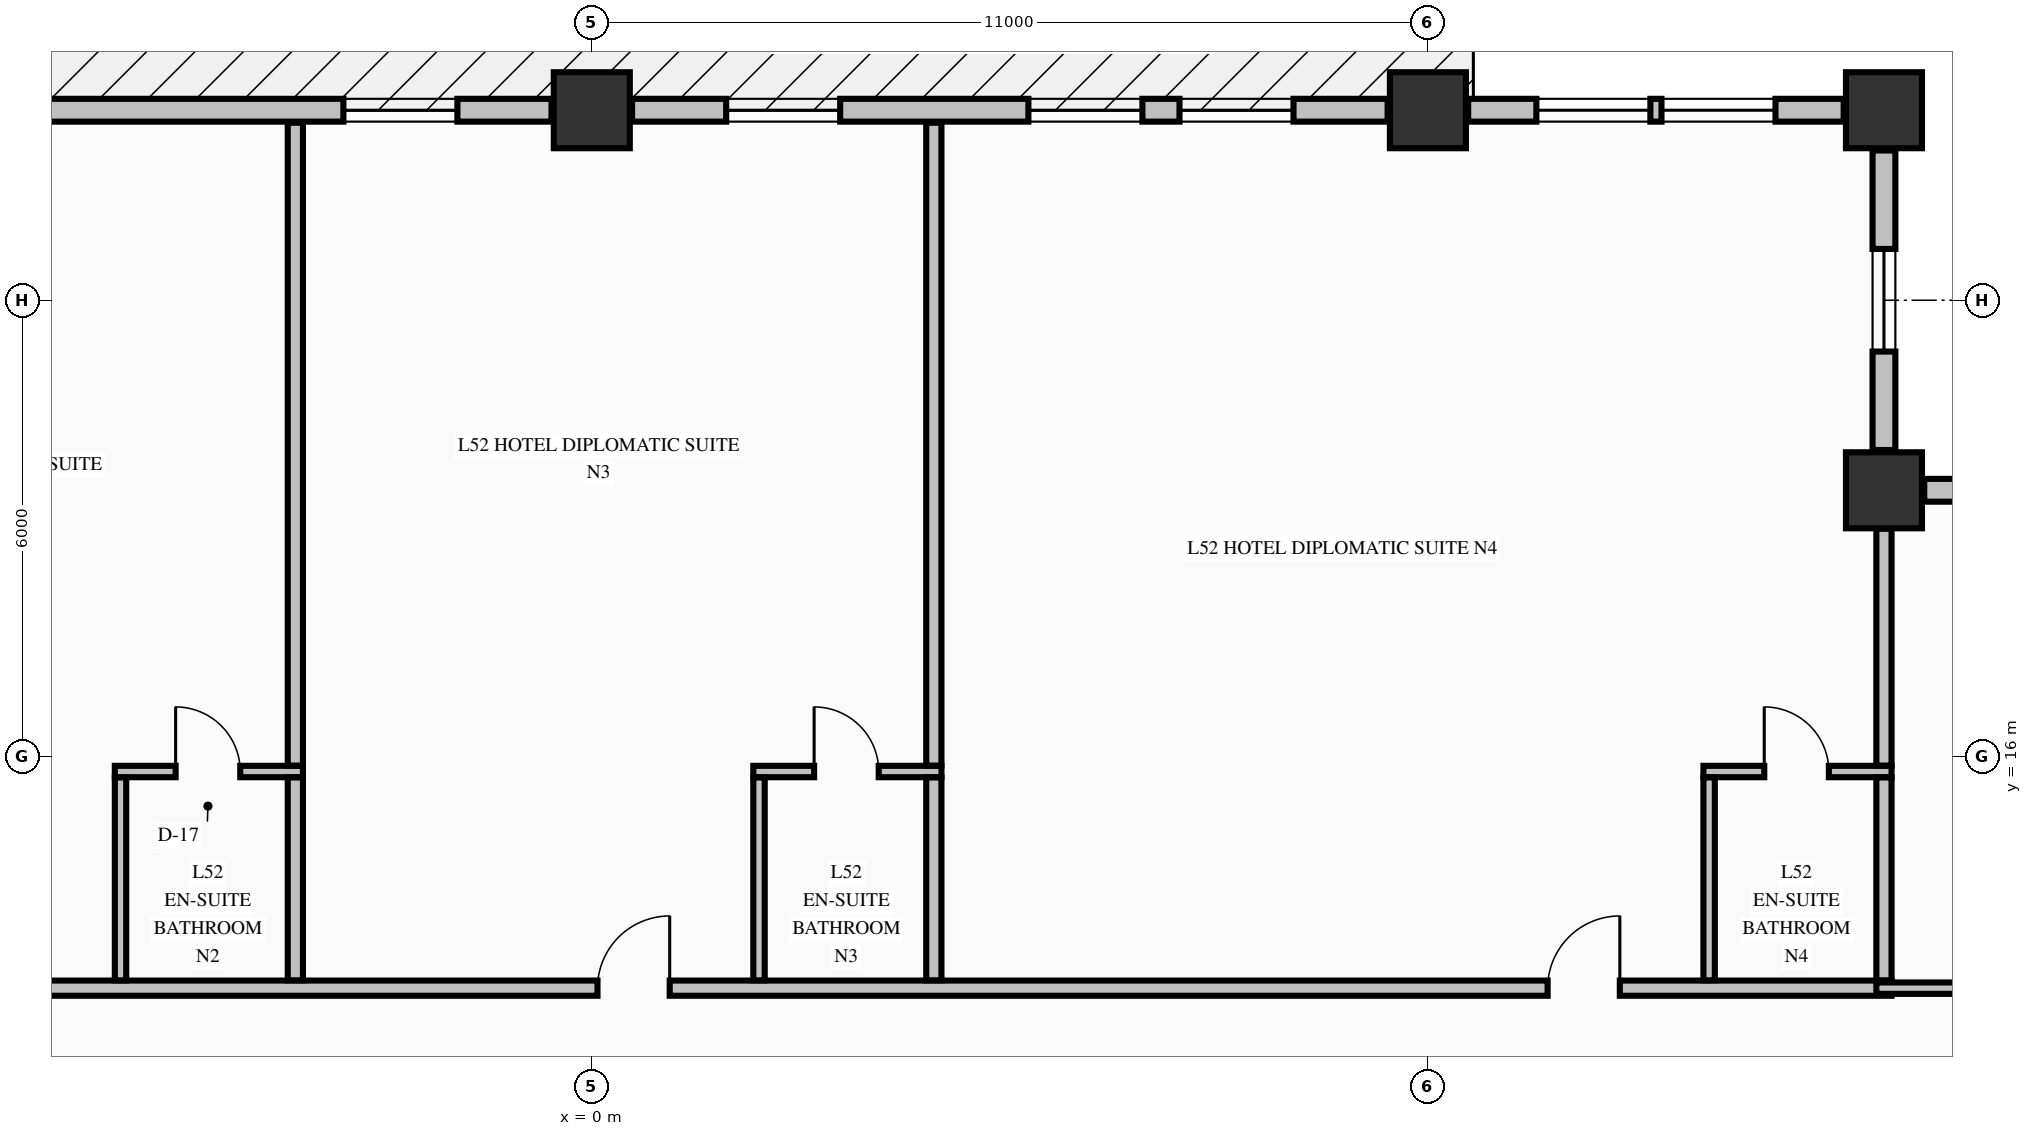
"""IFC4 building model, lengths in metres.
Left out: names, types, materials, properties, quantities, classifications, styles, units other than length and angle.
Written with IfcOpenShell. Run it as: python <this file> out.ifc"""

import sys

from ifc_helpers import new_model, si_unit, direction, frame, frame_2d, origin, origin_2d, place, context, subcontext, project, spatial, rectangle, extrude, element, fill, save


model = new_model("IFC4")
c1 = context("Model", 3, precision=1e-05, world=origin(), true_north=direction((0.0, 1.0)))
c2 = subcontext(c1, "Body", "Model", "MODEL_VIEW")
j1 = project(units=[si_unit("LENGTHUNIT", "METRE"), si_unit("PLANEANGLEUNIT", "RADIAN")], contexts=[c1])
p1 = place(None, origin())
s1 = spatial("IfcSite", under=j1, at=p1, CompositionType="ELEMENT")
p2 = place(p1, origin())
s2 = spatial("IfcBuilding", under=s1, at=p2, CompositionType="ELEMENT")
p3 = place(p2, frame((0.0, 0.0, 201.66)))
s3 = spatial("IfcBuildingStorey", under=s2, at=p3, CompositionType="ELEMENT", Elevation=201.66)
for number, where, z_axis, x_axis in (
    (1, (0.0, 24.5, -0.25), (0.0, 0.0, 1.0), (1.0, 0.0, 0.0)),
    (2, (11.0, 24.5, -0.25), (0.0, 0.0, 1.0), (1.0, 0.0, 0.0)),
    (3, (17.0, 24.5, -0.25), (0.0, 0.0, 1.0), (1.0, 0.0, 0.0)),
    (4, (17.0, 19.5, -0.25), (0.0, 0.0, 1.0), (1.0, 0.0, 0.0)),
):
    element("IfcColumn", number, at=place(p3, frame(where, z_axis=z_axis, x_axis=x_axis)), inside=s3, PredefinedType="COLUMN", context=c2, shape_type="SweptSolid", body=[
        extrude(rectangle(XDim=1.0, YDim=1.0, at=origin_2d()), origin(), (0.0, 0.0, 1.0), 3.4),
    ])
p4 = place(p3, frame((21.47, 19.5, 0.0), z_axis=(0.0, 0.0, 1.0), x_axis=(-1.0, 0.0, 0.0)))
e5 = element("IfcWall", 5, at=p4, inside=s3, PredefinedType="STANDARD", context=c2, shape_type="SweptSolid", body=[
    extrude(rectangle(XDim=3.94, YDim=0.3, at=frame_2d((1.97, 0.0))), origin(), (0.0, 0.0, 1.0), 2.542),
])
p5 = place(p4, frame((1.295, 0.0, 0.68)))
e6 = element("IfcOpeningElement", 6, at=p5, cuts=e5, PredefinedType="OPENING", context=c2, shape_type="SweptSolid", body=[
    extrude(rectangle(XDim=1.35, YDim=1.42, at=frame_2d((0.675, 0.71))), frame((0.0, 0.16, 0.0), z_axis=(0.0, -1.0, 0.0), x_axis=(1.0, 0.0, 0.0)), (0.0, 0.0, 1.0), 0.32),
])
p6 = place(p3, frame((17.0, 20.03, 0.0), z_axis=(0.0, 0.0, 1.0), x_axis=(0.0, 1.0, 0.0)))
e7 = element("IfcWall", 7, at=p6, inside=s3, PredefinedType="STANDARD", context=c2, shape_type="SweptSolid", body=[
    extrude(rectangle(XDim=3.94, YDim=0.3, at=frame_2d((1.97, 0.0))), origin(), (0.0, 0.0, 1.0), 2.542),
])
p7 = place(p6, frame((1.295, 0.0, 0.68)))
e8 = element("IfcOpeningElement", 8, at=p7, cuts=e7, PredefinedType="OPENING", context=c2, shape_type="SweptSolid", body=[
    extrude(rectangle(XDim=1.35, YDim=1.42, at=frame_2d((0.675, 0.71))), frame((0.0, 0.16, 0.0), z_axis=(0.0, -1.0, 0.0), x_axis=(1.0, 0.0, 0.0)), (0.0, 0.0, 1.0), 0.32),
])
p8 = place(p3, frame((-0.53, 24.5, 0.0), z_axis=(0.0, 0.0, 1.0), x_axis=(-1.0, 0.0, 0.0)))
e9 = element("IfcWall", 9, at=p8, inside=s3, PredefinedType="STANDARD", context=c2, shape_type="SweptSolid", body=[
    extrude(rectangle(XDim=9.94, YDim=0.3, at=frame_2d((4.97, 0.0))), origin(), (0.0, 0.0, 1.0), 2.542),
])
p9 = place(p8, frame((6.882, 0.0, 0.0)))
e10 = element("IfcOpeningElement", 10, at=p9, cuts=e9, PredefinedType="OPENING", context=c2, shape_type="SweptSolid", body=[
    extrude(rectangle(XDim=1.1, YDim=2.15, at=frame_2d((0.55, 1.075))), frame((0.0, 0.16, 0.0), z_axis=(0.0, -1.0, 0.0), x_axis=(1.0, 0.0, 0.0)), (0.0, 0.0, 1.0), 0.32),
])
p10 = place(p8, frame((1.238, 0.0, 0.72)))
e11 = element("IfcOpeningElement", 11, at=p10, cuts=e9, PredefinedType="OPENING", context=c2, shape_type="SweptSolid", body=[
    extrude(rectangle(XDim=1.5, YDim=1.6, at=frame_2d((0.75, 0.8))), frame((0.0, 0.16, 0.0), z_axis=(0.0, -1.0, 0.0), x_axis=(1.0, 0.0, 0.0)), (0.0, 0.0, 1.0), 0.32),
])
p11 = place(p3, frame((10.47, 24.5, 0.0), z_axis=(0.0, 0.0, 1.0), x_axis=(-1.0, 0.0, 0.0)))
e12 = element("IfcWall", 12, at=p11, inside=s3, PredefinedType="STANDARD", context=c2, shape_type="SweptSolid", body=[
    extrude(rectangle(XDim=9.94, YDim=0.3, at=frame_2d((4.97, 0.0))), origin(), (0.0, 0.0, 1.0), 2.542),
])
p12 = place(p11, frame((1.238, 0.0, 0.72)))
e13 = element("IfcOpeningElement", 13, at=p12, cuts=e12, PredefinedType="OPENING", context=c2, shape_type="SweptSolid", body=[
    extrude(rectangle(XDim=1.5, YDim=1.6, at=frame_2d((0.75, 0.8))), frame((0.0, 0.16, 0.0), z_axis=(0.0, -1.0, 0.0), x_axis=(1.0, 0.0, 0.0)), (0.0, 0.0, 1.0), 0.32),
])
p13 = place(p11, frame((3.226, 0.0, 0.72)))
e14 = element("IfcOpeningElement", 14, at=p13, cuts=e12, PredefinedType="OPENING", context=c2, shape_type="SweptSolid", body=[
    extrude(rectangle(XDim=1.5, YDim=1.6, at=frame_2d((0.75, 0.8))), frame((0.0, 0.16, 0.0), z_axis=(0.0, -1.0, 0.0), x_axis=(1.0, 0.0, 0.0)), (0.0, 0.0, 1.0), 0.32),
])
p14 = place(p11, frame((7.202, 0.0, 0.72)))
e15 = element("IfcOpeningElement", 15, at=p14, cuts=e12, PredefinedType="OPENING", context=c2, shape_type="SweptSolid", body=[
    extrude(rectangle(XDim=1.5, YDim=1.6, at=frame_2d((0.75, 0.8))), frame((0.0, 0.16, 0.0), z_axis=(0.0, -1.0, 0.0), x_axis=(1.0, 0.0, 0.0)), (0.0, 0.0, 1.0), 0.32),
])
p15 = place(p3, frame((16.47, 24.5, 0.0), z_axis=(0.0, 0.0, 1.0), x_axis=(-1.0, 0.0, 0.0)))
e16 = element("IfcWall", 16, at=p15, inside=s3, PredefinedType="STANDARD", context=c2, shape_type="SweptSolid", body=[
    extrude(rectangle(XDim=4.94, YDim=0.3, at=frame_2d((2.47, 0.0))), origin(), (0.0, 0.0, 1.0), 2.542),
])
p16 = place(p15, frame((0.897, 0.0, 0.72)))
e17 = element("IfcOpeningElement", 17, at=p16, cuts=e16, PredefinedType="OPENING", context=c2, shape_type="SweptSolid", body=[
    extrude(rectangle(XDim=1.5, YDim=1.6, at=frame_2d((0.75, 0.8))), frame((0.0, 0.16, 0.0), z_axis=(0.0, -1.0, 0.0), x_axis=(1.0, 0.0, 0.0)), (0.0, 0.0, 1.0), 0.32),
])
p17 = place(p15, frame((2.543, 0.0, 0.72)))
e18 = element("IfcOpeningElement", 18, at=p17, cuts=e16, PredefinedType="OPENING", context=c2, shape_type="SweptSolid", body=[
    extrude(rectangle(XDim=1.5, YDim=1.6, at=frame_2d((0.75, 0.8))), frame((0.0, 0.16, 0.0), z_axis=(0.0, -1.0, 0.0), x_axis=(1.0, 0.0, 0.0)), (0.0, 0.0, 1.0), 0.32),
])
p18 = place(p3, frame((-22.1, 12.95, 0.0), z_axis=(0.0, 0.0, 1.0), x_axis=(1.0, 0.0, 0.0)))
e19 = element("IfcWall", 19, at=p18, inside=s3, PredefinedType="PARTITIONING", context=c2, shape_type="SweptSolid", body=[
    extrude(rectangle(XDim=39.2, YDim=0.2, at=frame_2d((19.6, 0.0))), origin(), (0.0, 0.0, 1.0), 3.15),
])
p19 = place(p18, frame((4.525, 0.0, 0.0)))
e20 = element("IfcOpeningElement", 20, at=p19, cuts=e19, PredefinedType="OPENING", context=c2, shape_type="SweptSolid", body=[
    extrude(rectangle(XDim=0.95, YDim=2.15, at=frame_2d((0.475, 1.075))), frame((0.0, 0.11, 0.0), z_axis=(0.0, -1.0, 0.0), x_axis=(1.0, 0.0, 0.0)), (0.0, 0.0, 1.0), 0.22),
])
p20 = place(p18, frame((12.475, 0.0, 0.0)))
e21 = element("IfcOpeningElement", 21, at=p20, cuts=e19, PredefinedType="OPENING", context=c2, shape_type="SweptSolid", body=[
    extrude(rectangle(XDim=0.95, YDim=2.15, at=frame_2d((0.475, 1.075))), frame((0.0, 0.11, 0.0), z_axis=(0.0, -1.0, 0.0), x_axis=(1.0, 0.0, 0.0)), (0.0, 0.0, 1.0), 0.22),
])
p21 = place(p18, frame((22.175, 0.0, 0.0)))
e22 = element("IfcOpeningElement", 22, at=p21, cuts=e19, PredefinedType="OPENING", context=c2, shape_type="SweptSolid", body=[
    extrude(rectangle(XDim=0.95, YDim=2.15, at=frame_2d((0.475, 1.075))), frame((0.0, 0.11, 0.0), z_axis=(0.0, -1.0, 0.0), x_axis=(1.0, 0.0, 0.0)), (0.0, 0.0, 1.0), 0.22),
])
p22 = place(p18, frame((34.675, 0.0, 0.0)))
e23 = element("IfcOpeningElement", 23, at=p22, cuts=e19, PredefinedType="OPENING", context=c2, shape_type="SweptSolid", body=[
    extrude(rectangle(XDim=0.95, YDim=2.15, at=frame_2d((0.475, 1.075))), frame((0.0, 0.11, 0.0), z_axis=(0.0, -1.0, 0.0), x_axis=(1.0, 0.0, 0.0)), (0.0, 0.0, 1.0), 0.22),
])
p23 = place(p3, frame((16.9, 12.95, 0.0), z_axis=(0.0, 0.0, 1.0), x_axis=(1.0, 0.0, 0.0)))
e24 = element("IfcWall", 24, at=p23, inside=s3, PredefinedType="PARTITIONING", context=c2, shape_type="SweptSolid", body=[
    extrude(rectangle(XDim=3.175, YDim=0.15, at=frame_2d((1.587, 0.0))), origin(), (0.0, 0.0, 1.0), 3.15),
])
p24 = place(p3, frame((-6.275, 15.8, 0.0), z_axis=(0.0, 0.0, 1.0), x_axis=(1.0, 0.0, 0.0)))
e25 = element("IfcWall", 25, at=p24, inside=s3, PredefinedType="PARTITIONING", context=c2, shape_type="SweptSolid", body=[
    extrude(rectangle(XDim=2.475, YDim=0.15, at=frame_2d((1.237, 0.0))), origin(), (0.0, 0.0, 1.0), 3.15),
])
p25 = place(p24, frame((0.8, 0.0, 0.0)))
e26 = element("IfcOpeningElement", 26, at=p25, cuts=e25, PredefinedType="OPENING", context=c2, shape_type="SweptSolid", body=[
    extrude(rectangle(XDim=0.85, YDim=2.1, at=frame_2d((0.425, 1.05))), frame((0.0, 0.085, 0.0), z_axis=(0.0, -1.0, 0.0), x_axis=(1.0, 0.0, 0.0)), (0.0, 0.0, 1.0), 0.17),
])
p26 = place(p3, frame((2.125, 15.8, 0.0), z_axis=(0.0, 0.0, 1.0), x_axis=(1.0, 0.0, 0.0)))
e27 = element("IfcWall", 27, at=p26, inside=s3, PredefinedType="PARTITIONING", context=c2, shape_type="SweptSolid", body=[
    extrude(rectangle(XDim=2.475, YDim=0.15, at=frame_2d((1.238, 0.0))), origin(), (0.0, 0.0, 1.0), 3.15),
])
p27 = place(p26, frame((0.8, 0.0, 0.0)))
e28 = element("IfcOpeningElement", 28, at=p27, cuts=e27, PredefinedType="OPENING", context=c2, shape_type="SweptSolid", body=[
    extrude(rectangle(XDim=0.85, YDim=2.1, at=frame_2d((0.425, 1.05))), frame((0.0, 0.085, 0.0), z_axis=(0.0, -1.0, 0.0), x_axis=(1.0, 0.0, 0.0)), (0.0, 0.0, 1.0), 0.17),
])
p28 = place(p3, frame((14.625, 15.8, 0.0), z_axis=(0.0, 0.0, 1.0), x_axis=(1.0, 0.0, 0.0)))
e29 = element("IfcWall", 29, at=p28, inside=s3, PredefinedType="PARTITIONING", context=c2, shape_type="SweptSolid", body=[
    extrude(rectangle(XDim=2.475, YDim=0.15, at=frame_2d((1.238, 0.0))), origin(), (0.0, 0.0, 1.0), 3.15),
])
p29 = place(p28, frame((0.8, 0.0, 0.0)))
e30 = element("IfcOpeningElement", 30, at=p29, cuts=e29, PredefinedType="OPENING", context=c2, shape_type="SweptSolid", body=[
    extrude(rectangle(XDim=0.85, YDim=2.1, at=frame_2d((0.425, 1.05))), frame((0.0, 0.085, 0.0), z_axis=(0.0, -1.0, 0.0), x_axis=(1.0, 0.0, 0.0)), (0.0, 0.0, 1.0), 0.17),
])
p30 = place(p3, frame((-6.2, 13.053, 0.0), z_axis=(0.0, 0.0, 1.0), x_axis=(0.0, 1.0, 0.0)))
e31 = element("IfcWall", 31, at=p30, inside=s3, PredefinedType="PARTITIONING", context=c2, shape_type="SweptSolid", body=[
    extrude(rectangle(XDim=2.669, YDim=0.15, at=frame_2d((1.334, 0.0))), origin(), (0.0, 0.0, 1.0), 3.15),
])
p31 = place(p3, frame((-3.9, 13.053, 0.0), z_axis=(0.0, 0.0, 1.0), x_axis=(0.0, 1.0, 0.0)))
e32 = element("IfcWall", 32, at=p31, inside=s3, PredefinedType="PARTITIONING", context=c2, shape_type="SweptSolid", body=[
    extrude(rectangle(XDim=2.669, YDim=0.2, at=frame_2d((1.334, 0.0))), origin(), (0.0, 0.0, 1.0), 3.15),
])
p32 = place(p3, frame((-3.9, 15.878, 0.0), z_axis=(0.0, 0.0, 1.0), x_axis=(0.0, 1.0, 0.0)))
e33 = element("IfcWall", 33, at=p32, inside=s3, PredefinedType="PARTITIONING", context=c2, shape_type="SweptSolid", body=[
    extrude(rectangle(XDim=8.457, YDim=0.2, at=frame_2d((4.229, 0.0))), origin(), (0.0, 0.0, 1.0), 3.15),
])
p33 = place(p3, frame((2.2, 13.053, 0.0), z_axis=(0.0, 0.0, 1.0), x_axis=(0.0, 1.0, 0.0)))
e34 = element("IfcWall", 34, at=p33, inside=s3, PredefinedType="PARTITIONING", context=c2, shape_type="SweptSolid", body=[
    extrude(rectangle(XDim=2.669, YDim=0.15, at=frame_2d((1.334, 0.0))), origin(), (0.0, 0.0, 1.0), 3.15),
])
p34 = place(p3, frame((4.5, 13.053, 0.0), z_axis=(0.0, 0.0, 1.0), x_axis=(0.0, 1.0, 0.0)))
e35 = element("IfcWall", 35, at=p34, inside=s3, PredefinedType="PARTITIONING", context=c2, shape_type="SweptSolid", body=[
    extrude(rectangle(XDim=2.669, YDim=0.2, at=frame_2d((1.334, 0.0))), origin(), (0.0, 0.0, 1.0), 3.15),
])
p35 = place(p3, frame((4.5, 15.878, 0.0), z_axis=(0.0, 0.0, 1.0), x_axis=(0.0, 1.0, 0.0)))
e36 = element("IfcWall", 36, at=p35, inside=s3, PredefinedType="PARTITIONING", context=c2, shape_type="SweptSolid", body=[
    extrude(rectangle(XDim=8.457, YDim=0.2, at=frame_2d((4.229, 0.0))), origin(), (0.0, 0.0, 1.0), 3.15),
])
p36 = place(p3, frame((14.7, 13.053, 0.0), z_axis=(0.0, 0.0, 1.0), x_axis=(0.0, 1.0, 0.0)))
e37 = element("IfcWall", 37, at=p36, inside=s3, PredefinedType="PARTITIONING", context=c2, shape_type="SweptSolid", body=[
    extrude(rectangle(XDim=2.669, YDim=0.15, at=frame_2d((1.334, 0.0))), origin(), (0.0, 0.0, 1.0), 3.15),
])
p37 = place(p3, frame((17.0, 13.053, 0.0), z_axis=(0.0, 0.0, 1.0), x_axis=(0.0, 1.0, 0.0)))
e38 = element("IfcWall", 38, at=p37, inside=s3, PredefinedType="PARTITIONING", context=c2, shape_type="SweptSolid", body=[
    extrude(rectangle(XDim=2.669, YDim=0.2, at=frame_2d((1.334, 0.0))), origin(), (0.0, 0.0, 1.0), 3.15),
])
p38 = place(p3, frame((17.0, 15.878, 0.0), z_axis=(0.0, 0.0, 1.0), x_axis=(0.0, 1.0, 0.0)))
e39 = element("IfcWall", 39, at=p38, inside=s3, PredefinedType="PARTITIONING", context=c2, shape_type="SweptSolid", body=[
    extrude(rectangle(XDim=3.116, YDim=0.2, at=frame_2d((1.558, 0.0))), origin(), (0.0, 0.0, 1.0), 3.15),
])
p39 = place(p7, origin())
e40 = element("IfcWindow", 40, at=p39, inside=s3, PartitioningType="SINGLE_PANEL", PredefinedType="WINDOW", context=c2, shape_type="SweptSolid", body=[
    extrude(rectangle(XDim=1.35, YDim=1.42, at=frame_2d((0.675, 0.71))), frame((0.0, 0.03, 0.0), z_axis=(0.0, -1.0, 0.0), x_axis=(1.0, 0.0, 0.0)), (0.0, 0.0, 1.0), 0.06),
])
fill(e8, e40)
p40 = place(p10, origin())
e41 = element("IfcWindow", 41, at=p40, inside=s3, PartitioningType="SINGLE_PANEL", PredefinedType="WINDOW", context=c2, shape_type="SweptSolid", body=[
    extrude(rectangle(XDim=1.5, YDim=1.6, at=frame_2d((0.75, 0.8))), frame((0.0, 0.03, 0.0), z_axis=(0.0, -1.0, 0.0), x_axis=(1.0, 0.0, 0.0)), (0.0, 0.0, 1.0), 0.06),
])
fill(e11, e41)
p41 = place(p12, origin())
e42 = element("IfcWindow", 42, at=p41, inside=s3, PartitioningType="SINGLE_PANEL", PredefinedType="WINDOW", context=c2, shape_type="SweptSolid", body=[
    extrude(rectangle(XDim=1.5, YDim=1.6, at=frame_2d((0.75, 0.8))), frame((0.0, 0.03, 0.0), z_axis=(0.0, -1.0, 0.0), x_axis=(1.0, 0.0, 0.0)), (0.0, 0.0, 1.0), 0.06),
])
fill(e13, e42)
p42 = place(p13, origin())
e43 = element("IfcWindow", 43, at=p42, inside=s3, PartitioningType="SINGLE_PANEL", PredefinedType="WINDOW", context=c2, shape_type="SweptSolid", body=[
    extrude(rectangle(XDim=1.5, YDim=1.6, at=frame_2d((0.75, 0.8))), frame((0.0, 0.03, 0.0), z_axis=(0.0, -1.0, 0.0), x_axis=(1.0, 0.0, 0.0)), (0.0, 0.0, 1.0), 0.06),
])
fill(e14, e43)
p43 = place(p14, origin())
e44 = element("IfcWindow", 44, at=p43, inside=s3, PartitioningType="SINGLE_PANEL", PredefinedType="WINDOW", context=c2, shape_type="SweptSolid", body=[
    extrude(rectangle(XDim=1.5, YDim=1.6, at=frame_2d((0.75, 0.8))), frame((0.0, 0.03, 0.0), z_axis=(0.0, -1.0, 0.0), x_axis=(1.0, 0.0, 0.0)), (0.0, 0.0, 1.0), 0.06),
])
fill(e15, e44)
p44 = place(p16, origin())
e45 = element("IfcWindow", 45, at=p44, inside=s3, PartitioningType="SINGLE_PANEL", PredefinedType="WINDOW", context=c2, shape_type="SweptSolid", body=[
    extrude(rectangle(XDim=1.5, YDim=1.6, at=frame_2d((0.75, 0.8))), frame((0.0, 0.03, 0.0), z_axis=(0.0, -1.0, 0.0), x_axis=(1.0, 0.0, 0.0)), (0.0, 0.0, 1.0), 0.06),
])
fill(e17, e45)
p45 = place(p17, origin())
e46 = element("IfcWindow", 46, at=p45, inside=s3, PartitioningType="SINGLE_PANEL", PredefinedType="WINDOW", context=c2, shape_type="SweptSolid", body=[
    extrude(rectangle(XDim=1.5, YDim=1.6, at=frame_2d((0.75, 0.8))), frame((0.0, 0.03, 0.0), z_axis=(0.0, -1.0, 0.0), x_axis=(1.0, 0.0, 0.0)), (0.0, 0.0, 1.0), 0.06),
])
fill(e18, e46)
p46 = place(p25, origin())
e47 = element("IfcDoor", 47, at=p46, inside=s3, OperationType="SINGLE_SWING_LEFT", PredefinedType="DOOR", context=c2, shape_type="SweptSolid", body=[
    extrude(rectangle(XDim=0.85, YDim=2.1, at=frame_2d((0.425, 1.05))), frame((0.0, 0.025, 0.0), z_axis=(0.0, -1.0, 0.0), x_axis=(1.0, 0.0, 0.0)), (0.0, 0.0, 1.0), 0.05),
])
fill(e26, e47)
p47 = place(p21, origin())
e48 = element("IfcDoor", 48, at=p47, inside=s3, OperationType="SINGLE_SWING_RIGHT", PredefinedType="DOOR", context=c2, shape_type="SweptSolid", body=[
    extrude(rectangle(XDim=0.95, YDim=2.15, at=frame_2d((0.475, 1.075))), frame((0.0, 0.025, 0.0), z_axis=(0.0, -1.0, 0.0), x_axis=(1.0, 0.0, 0.0)), (0.0, 0.0, 1.0), 0.05),
])
fill(e22, e48)
p48 = place(p27, origin())
e49 = element("IfcDoor", 49, at=p48, inside=s3, OperationType="SINGLE_SWING_LEFT", PredefinedType="DOOR", context=c2, shape_type="SweptSolid", body=[
    extrude(rectangle(XDim=0.85, YDim=2.1, at=frame_2d((0.425, 1.05))), frame((0.0, 0.025, 0.0), z_axis=(0.0, -1.0, 0.0), x_axis=(1.0, 0.0, 0.0)), (0.0, 0.0, 1.0), 0.05),
])
fill(e28, e49)
p49 = place(p22, origin())
e50 = element("IfcDoor", 50, at=p49, inside=s3, OperationType="SINGLE_SWING_RIGHT", PredefinedType="DOOR", context=c2, shape_type="SweptSolid", body=[
    extrude(rectangle(XDim=0.95, YDim=2.15, at=frame_2d((0.475, 1.075))), frame((0.0, 0.025, 0.0), z_axis=(0.0, -1.0, 0.0), x_axis=(1.0, 0.0, 0.0)), (0.0, 0.0, 1.0), 0.05),
])
fill(e23, e50)
p50 = place(p29, origin())
e51 = element("IfcDoor", 51, at=p50, inside=s3, OperationType="SINGLE_SWING_LEFT", PredefinedType="DOOR", context=c2, shape_type="SweptSolid", body=[
    extrude(rectangle(XDim=0.85, YDim=2.1, at=frame_2d((0.425, 1.05))), frame((0.0, 0.025, 0.0), z_axis=(0.0, -1.0, 0.0), x_axis=(1.0, 0.0, 0.0)), (0.0, 0.0, 1.0), 0.05),
])
fill(e30, e51)
save(model, sys.argv[1])
